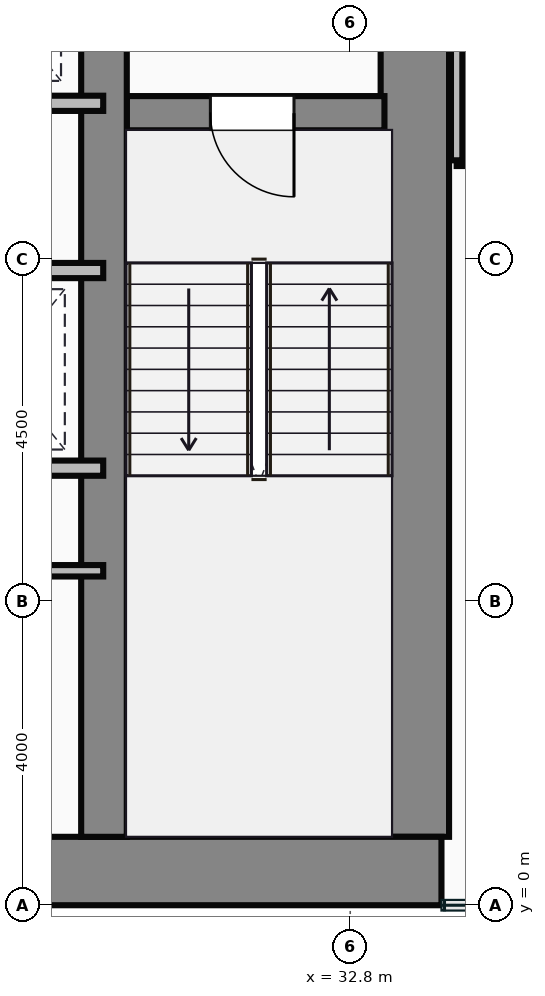
"""IFC4 building model, lengths in metres.
Left out: names, types, materials, properties, quantities, classifications, styles, units other than length and angle.
Written with IfcOpenShell. Run it as: python <this file> out.ifc"""

import sys

from ifc_helpers import new_model, si_unit, direction, frame, frame_2d, origin, place, context, subcontext, project, spatial, rectangle, extrude, source, transform, mapped, element, fill, save


model = new_model("IFC4")
c1 = context("Model", 3, precision=1e-05, world=origin(), true_north=direction((0.0, 1.0)))
c2 = subcontext(c1, "Body", "Model", "MODEL_VIEW")
j1 = project(units=[si_unit("LENGTHUNIT", "METRE"), si_unit("PLANEANGLEUNIT", "RADIAN")], contexts=[c1])
p1 = place(None, origin())
s1 = spatial("IfcSite", under=j1, at=p1, CompositionType="ELEMENT")
p2 = place(p1, origin())
s2 = spatial("IfcBuilding", under=s1, at=p2, CompositionType="ELEMENT")
p3 = place(p2, frame((0.0, 0.0, 43.45)))
s3 = spatial("IfcBuildingStorey", under=s2, at=p3, CompositionType="ELEMENT", Elevation=43.45)
m1 = source(origin(), c2, "Body", "SweptSolid", [
    extrude(rectangle(XDim=29.5, YDim=0.9, at=frame_2d((14.75, 0.0))), origin(), (0.0, 0.0, 1.0), 3.65),
])
p4 = place(p3, frame((4.5, 0.45, 0.0), z_axis=(0.0, 0.0, 1.0), x_axis=(1.0, 0.0, 0.0)))
e1 = element("IfcWall", 1, at=p4, inside=s3, PredefinedType="SHEAR", context=c2, shape_type="MappedRepresentation", body=[
    mapped(m1, transform((0.0, 0.0, 0.0))),
])
m2 = source(origin(), c2, "Body", "SweptSolid", [
    extrude(rectangle(XDim=13.1, YDim=0.9, at=frame_2d((6.55, 0.0))), origin(), (0.0, 0.0, 1.0), 3.65),
])
p5 = place(p3, frame((33.65, 0.9, 0.0), z_axis=(0.0, 0.0, 1.0), x_axis=(0.0, 1.0, 0.0)))
e2 = element("IfcWall", 2, at=p5, inside=s3, PredefinedType="SHEAR", context=c2, shape_type="MappedRepresentation", body=[
    mapped(m2, transform((0.0, 0.0, 0.0))),
])
m3 = source(origin(), c2, "Body", "SweptSolid", [
    extrude(rectangle(XDim=12.2, YDim=0.6, at=frame_2d((6.1, 0.0))), origin(), (0.0, 0.0, 1.0), 3.65),
])
p6 = place(p3, frame((29.56, 0.9, 0.0), z_axis=(0.0, 0.0, 1.0), x_axis=(0.0, 1.0, 0.0)))
e3 = element("IfcWall", 3, at=p6, inside=s3, PredefinedType="SHEAR", context=c2, shape_type="MappedRepresentation", body=[
    mapped(m3, transform((0.0, 0.0, 0.0))),
])
m4 = source(origin(), c2, "Body", "SweptSolid", [
    extrude(rectangle(XDim=3.39, YDim=0.45, at=frame_2d((1.695, 0.0))), origin(), (0.0, 0.0, 1.0), 3.65),
])
p7 = place(p3, frame((29.86, 10.42, 0.0), z_axis=(0.0, 0.0, 1.0), x_axis=(1.0, 0.0, 0.0)))
e4 = element("IfcWall", 4, at=p7, inside=s3, PredefinedType="SHEAR", context=c2, shape_type="MappedRepresentation", body=[
    mapped(m4, transform((0.0, 0.0, 0.0))),
])
p8 = place(p7, frame((1.1, 0.0, 0.0)))
e5 = element("IfcOpeningElement", 5, at=p8, cuts=e4, PredefinedType="OPENING", context=c2, shape_type="SweptSolid", body=[
    extrude(rectangle(XDim=1.1, YDim=2.15, at=frame_2d((0.55, 1.075))), frame((0.0, 0.235, 0.0), z_axis=(0.0, -1.0, 0.0), x_axis=(1.0, 0.0, 0.0)), (0.0, 0.0, 1.0), 0.47),
])
m5 = source(origin(), c2, "Body", "SweptSolid", [
    extrude(rectangle(XDim=8.8, YDim=0.2, at=frame_2d((4.4, 0.0))), origin(), (0.0, 0.0, 1.0), 3.4),
])
p9 = place(p3, frame((20.75, 10.55, 0.0), z_axis=(0.0, 0.0, 1.0), x_axis=(1.0, 0.0, 0.0)))
e6 = element("IfcWall", 6, at=p9, inside=s3, PredefinedType="PARTITIONING", context=c2, shape_type="MappedRepresentation", body=[
    mapped(m5, transform((0.0, 0.0, 0.0))),
])
m6 = source(origin(), c2, "Body", "SweptSolid", [
    extrude(rectangle(XDim=4.55, YDim=0.2, at=frame_2d((2.275, 0.0))), origin(), (0.0, 0.0, 1.0), 3.4),
])
for number, where, z_axis, x_axis in (
    (7, (25.0, 8.35, 0.0), (0.0, 0.0, 1.0), (1.0, 0.0, 0.0)),
    (8, (25.0, 5.75, 0.0), (0.0, 0.0, 1.0), (1.0, 0.0, 0.0)),
):
    element("IfcWall", number, at=place(p3, frame(where, z_axis=z_axis, x_axis=x_axis)), inside=s3, PredefinedType="PARTITIONING", context=c2, shape_type="MappedRepresentation", body=[
        mapped(m6, transform((0.0, 0.0, 0.0))),
    ])
m7 = source(origin(), c2, "Body", "SweptSolid", [
    extrude(rectangle(XDim=4.55, YDim=0.15, at=frame_2d((2.275, 0.0))), origin(), (0.0, 0.0, 1.0), 3.4),
])
p10 = place(p3, frame((25.0, 4.4, 0.0), z_axis=(0.0, 0.0, 1.0), x_axis=(1.0, 0.0, 0.0)))
e9 = element("IfcWall", 9, at=p10, inside=s3, PredefinedType="PARTITIONING", context=c2, shape_type="MappedRepresentation", body=[
    mapped(m7, transform((0.0, 0.0, 0.0))),
])
m8 = source(origin(), c2, "Body", "SweptSolid", [
    extrude(rectangle(XDim=4.8, YDim=0.15, at=frame_2d((2.4, 0.0))), origin(), (0.0, 0.0, 1.0), 3.4),
])
p11 = place(p3, frame((34.2, 9.8, 0.0), z_axis=(0.0, 0.0, 1.0), x_axis=(1.0, 0.0, 0.0)))
e10 = element("IfcWall", 10, at=p11, inside=s3, PredefinedType="PARTITIONING", context=c2, shape_type="MappedRepresentation", body=[
    mapped(m8, transform((0.0, 0.0, 0.0))),
])
m9 = source(origin(), c2, "Body", "SweptSolid", [
    extrude(rectangle(XDim=4.18, YDim=0.15, at=frame_2d((2.09, 0.0))), origin(), (0.0, 0.0, 1.0), 3.4),
])
p12 = place(p3, frame((34.2, 9.8, 0.0), z_axis=(0.0, 0.0, 1.0), x_axis=(0.0, 1.0, 0.0)))
e11 = element("IfcWall", 11, at=p12, inside=s3, PredefinedType="PARTITIONING", context=c2, shape_type="MappedRepresentation", body=[
    mapped(m9, transform((0.0, 0.0, 0.0))),
])
m10 = source(origin(), c2, "Body", "SweptSolid", [
    extrude(rectangle(XDim=1.1, YDim=2.15, at=frame_2d((0.55, 1.075))), frame((0.0, 0.025, 0.0), z_axis=(0.0, -1.0, 0.0), x_axis=(1.0, 0.0, 0.0)), (0.0, 0.0, 1.0), 0.05),
])
p13 = place(p8, frame((1.1, 0.0, 0.0), z_axis=(0.0, 0.0, 1.0), x_axis=(-1.0, 0.0, 0.0)))
e12 = element("IfcDoor", 12, at=p13, inside=s3, OperationType="SINGLE_SWING_RIGHT", PredefinedType="DOOR", context=c2, shape_type="MappedRepresentation", body=[
    mapped(m10, transform((0.0, 0.0, 0.0))),
])
fill(e5, e12)
save(model, sys.argv[1])
